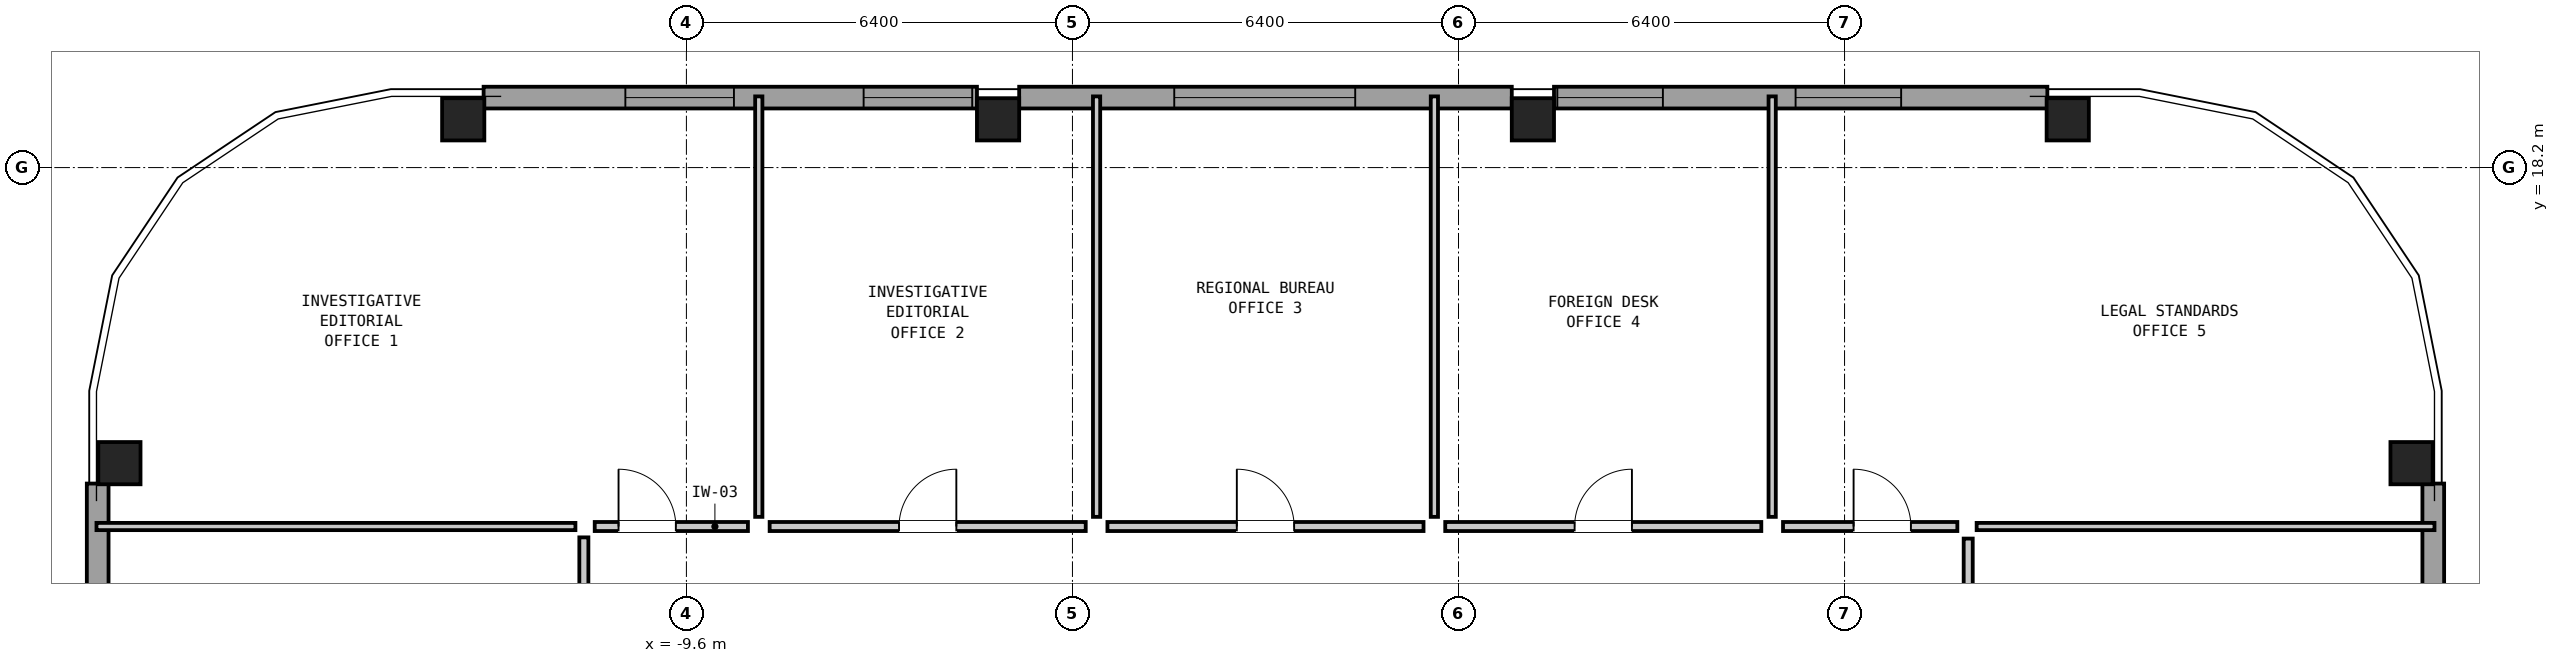
"""IFC4 building model, lengths in metres.
Left out: names, types, materials, properties, quantities, classifications, styles, units other than length and angle.
Written with IfcOpenShell. Run it as: python <this file> out.ifc"""

import sys

from ifc_helpers import new_model, si_unit, direction, frame, frame_2d, origin, origin_2d, place, context, subcontext, project, spatial, rectangle, hollow_rectangle, extrude, element, fill, save


model = new_model("IFC4")
c1 = context("Model", 3, precision=1e-05, world=origin(), true_north=direction((0.0, 1.0)))
c2 = subcontext(c1, "Body", "Model", "MODEL_VIEW")
j1 = project(units=[si_unit("LENGTHUNIT", "METRE"), si_unit("PLANEANGLEUNIT", "RADIAN")], contexts=[c1])
p1 = place(None, origin())
s1 = spatial("IfcSite", under=j1, at=p1, CompositionType="ELEMENT")
p2 = place(p1, origin())
s2 = spatial("IfcBuilding", under=s1, at=p2, CompositionType="ELEMENT")
p3 = place(p2, frame((0.0, 0.0, 208.65)))
s3 = spatial("IfcBuildingStorey", under=s2, at=p3, CompositionType="ELEMENT", Elevation=208.65)
for number, where, z_axis, x_axis in (
    (1, (19.0, 13.3, 0.0), (0.0, 0.0, 1.0), (0.0, 1.0, 0.0)),
    (2, (13.3, 19.0, 0.0), (0.0, 0.0, 1.0), (1.0, 0.0, 0.0)),
    (3, (4.433, 19.0, 0.0), (0.0, 0.0, 1.0), (1.0, 0.0, 0.0)),
    (4, (-4.433, 19.0, 0.0), (0.0, 0.0, 1.0), (1.0, 0.0, 0.0)),
    (5, (-13.3, 19.0, 0.0), (0.0, 0.0, 1.0), (1.0, 0.0, 0.0)),
    (6, (-19.0, 13.3, 0.0), (0.0, 0.0, 1.0), (0.0, 1.0, 0.0)),
):
    element("IfcColumn", number, at=place(p3, frame(where, z_axis=z_axis, x_axis=x_axis)), inside=s3, PredefinedType="COLUMN", context=c2, shape_type="SweptSolid", body=[
        extrude(hollow_rectangle(XDim=0.7, YDim=0.7, WallThickness=0.045, at=origin_2d()), origin(), (0.0, 0.0, 1.0), 3.05),
    ])
p4 = place(p3, frame((19.36, 12.962, 0.0), z_axis=(0.0, 0.0, 1.0), x_axis=(0.0, -1.0, 0.0)))
e7 = element("IfcWall", 7, at=p4, inside=s3, PredefinedType="SOLIDWALL", context=c2, shape_type="SweptSolid", body=[
    extrude(rectangle(XDim=8.179, YDim=0.36, at=frame_2d((4.089, 0.0))), origin(), (0.0, 0.0, 1.0), 2.374),
])
p5 = place(p4, frame((1.95, 0.0, 0.2)))
e8 = element("IfcOpeningElement", 8, at=p5, cuts=e7, PredefinedType="OPENING", context=c2, shape_type="SweptSolid", body=[
    extrude(rectangle(XDim=3.5, YDim=0.95, at=frame_2d((1.75, 0.475))), frame((0.0, 0.192, 0.0), z_axis=(0.0, -1.0, 0.0), x_axis=(1.0, 0.0, 0.0)), (0.0, 0.0, 1.0), 0.384),
])
p6 = place(p4, frame((6.3, 0.0, 1.15)))
e9 = element("IfcOpeningElement", 9, at=p6, cuts=e7, PredefinedType="OPENING", context=c2, shape_type="SweptSolid", body=[
    extrude(rectangle(XDim=1.8, YDim=1.05, at=frame_2d((0.9, 0.525))), frame((0.0, 0.192, 0.0), z_axis=(0.0, -1.0, 0.0), x_axis=(1.0, 0.0, 0.0)), (0.0, 0.0, 1.0), 0.384),
])
p7 = place(p3, frame((-12.962, 19.36, 0.0), z_axis=(0.0, 0.0, 1.0), x_axis=(1.0, 0.0, 0.0)))
e10 = element("IfcWall", 10, at=p7, inside=s3, PredefinedType="SOLIDWALL", context=c2, shape_type="SweptSolid", body=[
    extrude(rectangle(XDim=8.179, YDim=0.36, at=frame_2d((4.089, 0.0))), origin(), (0.0, 0.0, 1.0), 2.374),
])
p8 = place(p7, frame((2.35, 0.0, 0.2)))
e11 = element("IfcOpeningElement", 11, at=p8, cuts=e10, PredefinedType="OPENING", context=c2, shape_type="SweptSolid", body=[
    extrude(rectangle(XDim=1.8, YDim=1.1, at=frame_2d((0.9, 0.55))), frame((0.0, 0.192, 0.0), z_axis=(0.0, -1.0, 0.0), x_axis=(1.0, 0.0, 0.0)), (0.0, 0.0, 1.0), 0.384),
])
p9 = place(p7, frame((6.3, 0.0, 1.25)))
e12 = element("IfcOpeningElement", 12, at=p9, cuts=e10, PredefinedType="OPENING", context=c2, shape_type="SweptSolid", body=[
    extrude(rectangle(XDim=1.8, YDim=0.95, at=frame_2d((0.9, 0.475))), frame((0.0, 0.192, 0.0), z_axis=(0.0, -1.0, 0.0), x_axis=(1.0, 0.0, 0.0)), (0.0, 0.0, 1.0), 0.384),
])
p10 = place(p3, frame((-4.083, 19.36, 0.0), z_axis=(0.0, 0.0, 1.0), x_axis=(1.0, 0.0, 0.0)))
e13 = element("IfcWall", 13, at=p10, inside=s3, PredefinedType="SOLIDWALL", context=c2, shape_type="SweptSolid", body=[
    extrude(rectangle(XDim=8.167, YDim=0.36, at=frame_2d((4.083, 0.0))), origin(), (0.0, 0.0, 1.0), 2.374),
])
p11 = place(p10, frame((2.571, 0.0, 0.2)))
e14 = element("IfcOpeningElement", 14, at=p11, cuts=e13, PredefinedType="OPENING", context=c2, shape_type="SweptSolid", body=[
    extrude(rectangle(XDim=3.0, YDim=1.0, at=frame_2d((1.5, 0.5))), frame((0.0, 0.192, 0.0), z_axis=(0.0, -1.0, 0.0), x_axis=(1.0, 0.0, 0.0)), (0.0, 0.0, 1.0), 0.384),
])
p12 = place(p3, frame((4.783, 19.36, 0.0), z_axis=(0.0, 0.0, 1.0), x_axis=(1.0, 0.0, 0.0)))
e15 = element("IfcWall", 15, at=p12, inside=s3, PredefinedType="SOLIDWALL", context=c2, shape_type="SweptSolid", body=[
    extrude(rectangle(XDim=8.179, YDim=0.36, at=frame_2d((4.089, 0.0))), origin(), (0.0, 0.0, 1.0), 2.374),
])
p13 = place(p12, frame((0.055, 0.0, 1.2)))
e16 = element("IfcOpeningElement", 16, at=p13, cuts=e15, PredefinedType="OPENING", context=c2, shape_type="SweptSolid", body=[
    extrude(rectangle(XDim=1.75, YDim=1.0, at=frame_2d((0.875, 0.5))), frame((0.0, 0.192, 0.0), z_axis=(0.0, -1.0, 0.0), x_axis=(1.0, 0.0, 0.0)), (0.0, 0.0, 1.0), 0.384),
])
p14 = place(p12, frame((4.005, 0.0, 0.2)))
e17 = element("IfcOpeningElement", 17, at=p14, cuts=e15, PredefinedType="OPENING", context=c2, shape_type="SweptSolid", body=[
    extrude(rectangle(XDim=1.75, YDim=1.15, at=frame_2d((0.875, 0.575))), frame((0.0, 0.192, 0.0), z_axis=(0.0, -1.0, 0.0), x_axis=(1.0, 0.0, 0.0)), (0.0, 0.0, 1.0), 0.384),
])
p15 = place(p3, frame((-19.36, 4.783, 0.0), z_axis=(0.0, 0.0, 1.0), x_axis=(0.0, 1.0, 0.0)))
e18 = element("IfcWall", 18, at=p15, inside=s3, PredefinedType="SOLIDWALL", context=c2, shape_type="SweptSolid", body=[
    extrude(rectangle(XDim=8.179, YDim=0.36, at=frame_2d((4.089, 0.0))), origin(), (0.0, 0.0, 1.0), 2.374),
])
p16 = place(p15, frame((0.055, 0.0, 1.1)))
e19 = element("IfcOpeningElement", 19, at=p16, cuts=e18, PredefinedType="OPENING", context=c2, shape_type="SweptSolid", body=[
    extrude(rectangle(XDim=1.75, YDim=1.1, at=frame_2d((0.875, 0.55))), frame((0.0, 0.192, 0.0), z_axis=(0.0, -1.0, 0.0), x_axis=(1.0, 0.0, 0.0)), (0.0, 0.0, 1.0), 0.384),
])
p17 = place(p15, frame((2.805, 0.0, 0.2)))
e20 = element("IfcOpeningElement", 20, at=p17, cuts=e18, PredefinedType="OPENING", context=c2, shape_type="SweptSolid", body=[
    extrude(rectangle(XDim=3.35, YDim=1.0, at=frame_2d((1.675, 0.5))), frame((0.0, 0.192, 0.0), z_axis=(0.0, -1.0, 0.0), x_axis=(1.0, 0.0, 0.0)), (0.0, 0.0, 1.0), 0.384),
])
p18 = place(p3, frame((-19.38, 12.25, 0.0), z_axis=(0.0, 0.0, 1.0), x_axis=(1.0, 0.0, 0.0)))
e21 = element("IfcWall", 21, at=p18, inside=s3, PredefinedType="PARTITIONING", context=c2, shape_type="SweptSolid", body=[
    extrude(rectangle(XDim=7.94, YDim=0.12, at=frame_2d((3.97, 0.0))), origin(), (0.0, 0.0, 1.0), 2.86),
])
p19 = place(p3, frame((11.79, 12.25, 0.0), z_axis=(0.0, 0.0, 1.0), x_axis=(1.0, 0.0, 0.0)))
e22 = element("IfcWall", 22, at=p19, inside=s3, PredefinedType="PARTITIONING", context=c2, shape_type="SweptSolid", body=[
    extrude(rectangle(XDim=7.59, YDim=0.12, at=frame_2d((3.795, 0.0))), origin(), (0.0, 0.0, 1.0), 2.86),
])
p20 = place(p3, frame((-8.4, 12.41, 0.0), z_axis=(0.0, 0.0, 1.0), x_axis=(0.0, 1.0, 0.0)))
e23 = element("IfcWall", 23, at=p20, inside=s3, PredefinedType="PARTITIONING", context=c2, shape_type="SweptSolid", body=[
    extrude(rectangle(XDim=6.97, YDim=0.12, at=frame_2d((3.485, 0.0))), origin(), (0.0, 0.0, 1.0), 2.86),
])
for number, where, z_axis, x_axis in (
    (24, (-2.8, 12.41, 0.0), (0.0, 0.0, 1.0), (0.0, 1.0, 0.0)),
    (25, (2.8, 12.41, 0.0), (0.0, 0.0, 1.0), (0.0, 1.0, 0.0)),
):
    element("IfcWall", number, at=place(p3, frame(where, z_axis=z_axis, x_axis=x_axis)), inside=s3, PredefinedType="PARTITIONING", context=c2, shape_type="SweptSolid", body=[
        extrude(rectangle(XDim=6.97, YDim=0.12, at=frame_2d((3.485, 0.0))), origin(), (0.0, 0.0, 1.0), 2.381),
    ])
p21 = place(p3, frame((8.4, 12.41, 0.0), z_axis=(0.0, 0.0, 1.0), x_axis=(0.0, 1.0, 0.0)))
e26 = element("IfcWall", 26, at=p21, inside=s3, PredefinedType="PARTITIONING", context=c2, shape_type="SweptSolid", body=[
    extrude(rectangle(XDim=6.97, YDim=0.12, at=frame_2d((3.485, 0.0))), origin(), (0.0, 0.0, 1.0), 2.86),
])
p22 = place(p3, frame((-11.12, 12.25, 0.0), z_axis=(0.0, 0.0, 1.0), x_axis=(1.0, 0.0, 0.0)))
e27 = element("IfcWall", 27, at=p22, inside=s3, PredefinedType="PARTITIONING", context=c2, shape_type="SweptSolid", body=[
    extrude(rectangle(XDim=2.54, YDim=0.15, at=frame_2d((1.27, 0.0))), origin(), (0.0, 0.0, 1.0), 2.86),
])
p23 = place(p22, frame((0.395, 0.0, 0.0)))
e28 = element("IfcOpeningElement", 28, at=p23, cuts=e27, PredefinedType="OPENING", context=c2, shape_type="SweptSolid", body=[
    extrude(rectangle(XDim=0.95, YDim=2.1, at=frame_2d((0.475, 1.05))), frame((0.0, 0.087, 0.0), z_axis=(0.0, -1.0, 0.0), x_axis=(1.0, 0.0, 0.0)), (0.0, 0.0, 1.0), 0.174),
])
p24 = place(p3, frame((-8.22, 12.25, 0.0), z_axis=(0.0, 0.0, 1.0), x_axis=(1.0, 0.0, 0.0)))
e29 = element("IfcWall", 29, at=p24, inside=s3, PredefinedType="PARTITIONING", context=c2, shape_type="SweptSolid", body=[
    extrude(rectangle(XDim=5.24, YDim=0.15, at=frame_2d((2.62, 0.0))), origin(), (0.0, 0.0, 1.0), 2.86),
])
p25 = place(p24, frame((2.145, 0.0, 0.0)))
e30 = element("IfcOpeningElement", 30, at=p25, cuts=e29, PredefinedType="OPENING", context=c2, shape_type="SweptSolid", body=[
    extrude(rectangle(XDim=0.95, YDim=2.1, at=frame_2d((0.475, 1.05))), frame((0.0, 0.087, 0.0), z_axis=(0.0, -1.0, 0.0), x_axis=(1.0, 0.0, 0.0)), (0.0, 0.0, 1.0), 0.174),
])
p26 = place(p3, frame((-2.62, 12.25, 0.0), z_axis=(0.0, 0.0, 1.0), x_axis=(1.0, 0.0, 0.0)))
e31 = element("IfcWall", 31, at=p26, inside=s3, PredefinedType="PARTITIONING", context=c2, shape_type="SweptSolid", body=[
    extrude(rectangle(XDim=5.24, YDim=0.15, at=frame_2d((2.62, 0.0))), origin(), (0.0, 0.0, 1.0), 2.86),
])
p27 = place(p26, frame((2.145, 0.0, 0.0)))
e32 = element("IfcOpeningElement", 32, at=p27, cuts=e31, PredefinedType="OPENING", context=c2, shape_type="SweptSolid", body=[
    extrude(rectangle(XDim=0.95, YDim=2.1, at=frame_2d((0.475, 1.05))), frame((0.0, 0.087, 0.0), z_axis=(0.0, -1.0, 0.0), x_axis=(1.0, 0.0, 0.0)), (0.0, 0.0, 1.0), 0.174),
])
p28 = place(p3, frame((2.98, 12.25, 0.0), z_axis=(0.0, 0.0, 1.0), x_axis=(1.0, 0.0, 0.0)))
e33 = element("IfcWall", 33, at=p28, inside=s3, PredefinedType="PARTITIONING", context=c2, shape_type="SweptSolid", body=[
    extrude(rectangle(XDim=5.24, YDim=0.15, at=frame_2d((2.62, 0.0))), origin(), (0.0, 0.0, 1.0), 2.86),
])
p29 = place(p28, frame((2.145, 0.0, 0.0)))
e34 = element("IfcOpeningElement", 34, at=p29, cuts=e33, PredefinedType="OPENING", context=c2, shape_type="SweptSolid", body=[
    extrude(rectangle(XDim=0.95, YDim=2.1, at=frame_2d((0.475, 1.05))), frame((0.0, 0.087, 0.0), z_axis=(0.0, -1.0, 0.0), x_axis=(1.0, 0.0, 0.0)), (0.0, 0.0, 1.0), 0.174),
])
p30 = place(p3, frame((8.58, 12.25, 0.0), z_axis=(0.0, 0.0, 1.0), x_axis=(1.0, 0.0, 0.0)))
e35 = element("IfcWall", 35, at=p30, inside=s3, PredefinedType="PARTITIONING", context=c2, shape_type="SweptSolid", body=[
    extrude(rectangle(XDim=2.89, YDim=0.15, at=frame_2d((1.445, 0.0))), origin(), (0.0, 0.0, 1.0), 2.86),
])
p31 = place(p30, frame((1.17, 0.0, 0.0)))
e36 = element("IfcOpeningElement", 36, at=p31, cuts=e35, PredefinedType="OPENING", context=c2, shape_type="SweptSolid", body=[
    extrude(rectangle(XDim=0.95, YDim=2.1, at=frame_2d((0.475, 1.05))), frame((0.0, 0.087, 0.0), z_axis=(0.0, -1.0, 0.0), x_axis=(1.0, 0.0, 0.0)), (0.0, 0.0, 1.0), 0.174),
])
p32 = place(p3, frame((-11.3, 0.18, 0.0), z_axis=(0.0, 0.0, 1.0), x_axis=(0.0, 1.0, 0.0)))
e37 = element("IfcWall", 37, at=p32, inside=s3, PredefinedType="PARTITIONING", context=c2, shape_type="SweptSolid", body=[
    extrude(rectangle(XDim=11.89, YDim=0.15, at=frame_2d((5.945, 0.0))), origin(), (0.0, 0.0, 1.0), 2.86),
])
p33 = place(p32, frame((5.47, 0.0, 0.0)))
e38 = element("IfcOpeningElement", 38, at=p33, cuts=e37, PredefinedType="OPENING", context=c2, shape_type="SweptSolid", body=[
    extrude(rectangle(XDim=0.95, YDim=2.1, at=frame_2d((0.475, 1.05))), frame((0.0, 0.087, 0.0), z_axis=(0.0, -1.0, 0.0), x_axis=(1.0, 0.0, 0.0)), (0.0, 0.0, 1.0), 0.174),
])
p34 = place(p3, frame((11.65, 3.8, 0.0), z_axis=(0.0, 0.0, 1.0), x_axis=(0.0, 1.0, 0.0)))
e39 = element("IfcWall", 39, at=p34, inside=s3, PredefinedType="PARTITIONING", context=c2, shape_type="SweptSolid", body=[
    extrude(rectangle(XDim=8.25, YDim=0.15, at=frame_2d((4.125, 0.0))), origin(), (0.0, 0.0, 1.0), 2.86),
])
p35 = place(p34, frame((3.65, 0.0, 0.0)))
e40 = element("IfcOpeningElement", 40, at=p35, cuts=e39, PredefinedType="OPENING", context=c2, shape_type="SweptSolid", body=[
    extrude(rectangle(XDim=0.95, YDim=2.1, at=frame_2d((0.475, 1.05))), frame((0.0, 0.087, 0.0), z_axis=(0.0, -1.0, 0.0), x_axis=(1.0, 0.0, 0.0)), (0.0, 0.0, 1.0), 0.174),
])
p36 = place(p8, origin())
e41 = element("IfcWindow", 41, at=p36, inside=s3, PartitioningType="SINGLE_PANEL", PredefinedType="WINDOW", context=c2, shape_type="SweptSolid", body=[
    extrude(rectangle(XDim=1.8, YDim=1.1, at=frame_2d((0.9, 0.55))), frame((0.0, 0.03, 0.0), z_axis=(0.0, -1.0, 0.0), x_axis=(1.0, 0.0, 0.0)), (0.0, 0.0, 1.0), 0.06),
])
fill(e11, e41)
p37 = place(p9, origin())
e42 = element("IfcWindow", 42, at=p37, inside=s3, PartitioningType="SINGLE_PANEL", PredefinedType="WINDOW", context=c2, shape_type="SweptSolid", body=[
    extrude(rectangle(XDim=1.8, YDim=0.95, at=frame_2d((0.9, 0.475))), frame((0.0, 0.03, 0.0), z_axis=(0.0, -1.0, 0.0), x_axis=(1.0, 0.0, 0.0)), (0.0, 0.0, 1.0), 0.06),
])
fill(e12, e42)
p38 = place(p11, origin())
e43 = element("IfcWindow", 43, at=p38, inside=s3, PartitioningType="SINGLE_PANEL", PredefinedType="WINDOW", context=c2, shape_type="SweptSolid", body=[
    extrude(rectangle(XDim=3.0, YDim=1.0, at=frame_2d((1.5, 0.5))), frame((0.0, 0.03, 0.0), z_axis=(0.0, -1.0, 0.0), x_axis=(1.0, 0.0, 0.0)), (0.0, 0.0, 1.0), 0.06),
])
fill(e14, e43)
p39 = place(p13, origin())
e44 = element("IfcWindow", 44, at=p39, inside=s3, PartitioningType="SINGLE_PANEL", PredefinedType="WINDOW", context=c2, shape_type="SweptSolid", body=[
    extrude(rectangle(XDim=1.75, YDim=1.0, at=frame_2d((0.875, 0.5))), frame((0.0, 0.03, 0.0), z_axis=(0.0, -1.0, 0.0), x_axis=(1.0, 0.0, 0.0)), (0.0, 0.0, 1.0), 0.06),
])
fill(e16, e44)
p40 = place(p14, origin())
e45 = element("IfcWindow", 45, at=p40, inside=s3, PartitioningType="SINGLE_PANEL", PredefinedType="WINDOW", context=c2, shape_type="SweptSolid", body=[
    extrude(rectangle(XDim=1.75, YDim=1.15, at=frame_2d((0.875, 0.575))), frame((0.0, 0.03, 0.0), z_axis=(0.0, -1.0, 0.0), x_axis=(1.0, 0.0, 0.0)), (0.0, 0.0, 1.0), 0.06),
])
fill(e17, e45)
p41 = place(p23, origin())
e46 = element("IfcDoor", 46, at=p41, inside=s3, OperationType="SINGLE_SWING_LEFT", PredefinedType="DOOR", context=c2, shape_type="SweptSolid", body=[
    extrude(rectangle(XDim=0.95, YDim=2.1, at=frame_2d((0.475, 1.05))), frame((0.0, 0.025, 0.0), z_axis=(0.0, -1.0, 0.0), x_axis=(1.0, 0.0, 0.0)), (0.0, 0.0, 1.0), 0.05),
])
fill(e28, e46)
p42 = place(p25, origin())
e47 = element("IfcDoor", 47, at=p42, inside=s3, OperationType="SINGLE_SWING_RIGHT", PredefinedType="DOOR", context=c2, shape_type="SweptSolid", body=[
    extrude(rectangle(XDim=0.95, YDim=2.1, at=frame_2d((0.475, 1.05))), frame((0.0, 0.025, 0.0), z_axis=(0.0, -1.0, 0.0), x_axis=(1.0, 0.0, 0.0)), (0.0, 0.0, 1.0), 0.05),
])
fill(e30, e47)
p43 = place(p27, origin())
e48 = element("IfcDoor", 48, at=p43, inside=s3, OperationType="SINGLE_SWING_LEFT", PredefinedType="DOOR", context=c2, shape_type="SweptSolid", body=[
    extrude(rectangle(XDim=0.95, YDim=2.1, at=frame_2d((0.475, 1.05))), frame((0.0, 0.025, 0.0), z_axis=(0.0, -1.0, 0.0), x_axis=(1.0, 0.0, 0.0)), (0.0, 0.0, 1.0), 0.05),
])
fill(e32, e48)
p44 = place(p29, origin())
e49 = element("IfcDoor", 49, at=p44, inside=s3, OperationType="SINGLE_SWING_RIGHT", PredefinedType="DOOR", context=c2, shape_type="SweptSolid", body=[
    extrude(rectangle(XDim=0.95, YDim=2.1, at=frame_2d((0.475, 1.05))), frame((0.0, 0.025, 0.0), z_axis=(0.0, -1.0, 0.0), x_axis=(1.0, 0.0, 0.0)), (0.0, 0.0, 1.0), 0.05),
])
fill(e34, e49)
p45 = place(p31, origin())
e50 = element("IfcDoor", 50, at=p45, inside=s3, OperationType="SINGLE_SWING_LEFT", PredefinedType="DOOR", context=c2, shape_type="SweptSolid", body=[
    extrude(rectangle(XDim=0.95, YDim=2.1, at=frame_2d((0.475, 1.05))), frame((0.0, 0.025, 0.0), z_axis=(0.0, -1.0, 0.0), x_axis=(1.0, 0.0, 0.0)), (0.0, 0.0, 1.0), 0.05),
])
fill(e36, e50)
save(model, sys.argv[1])
